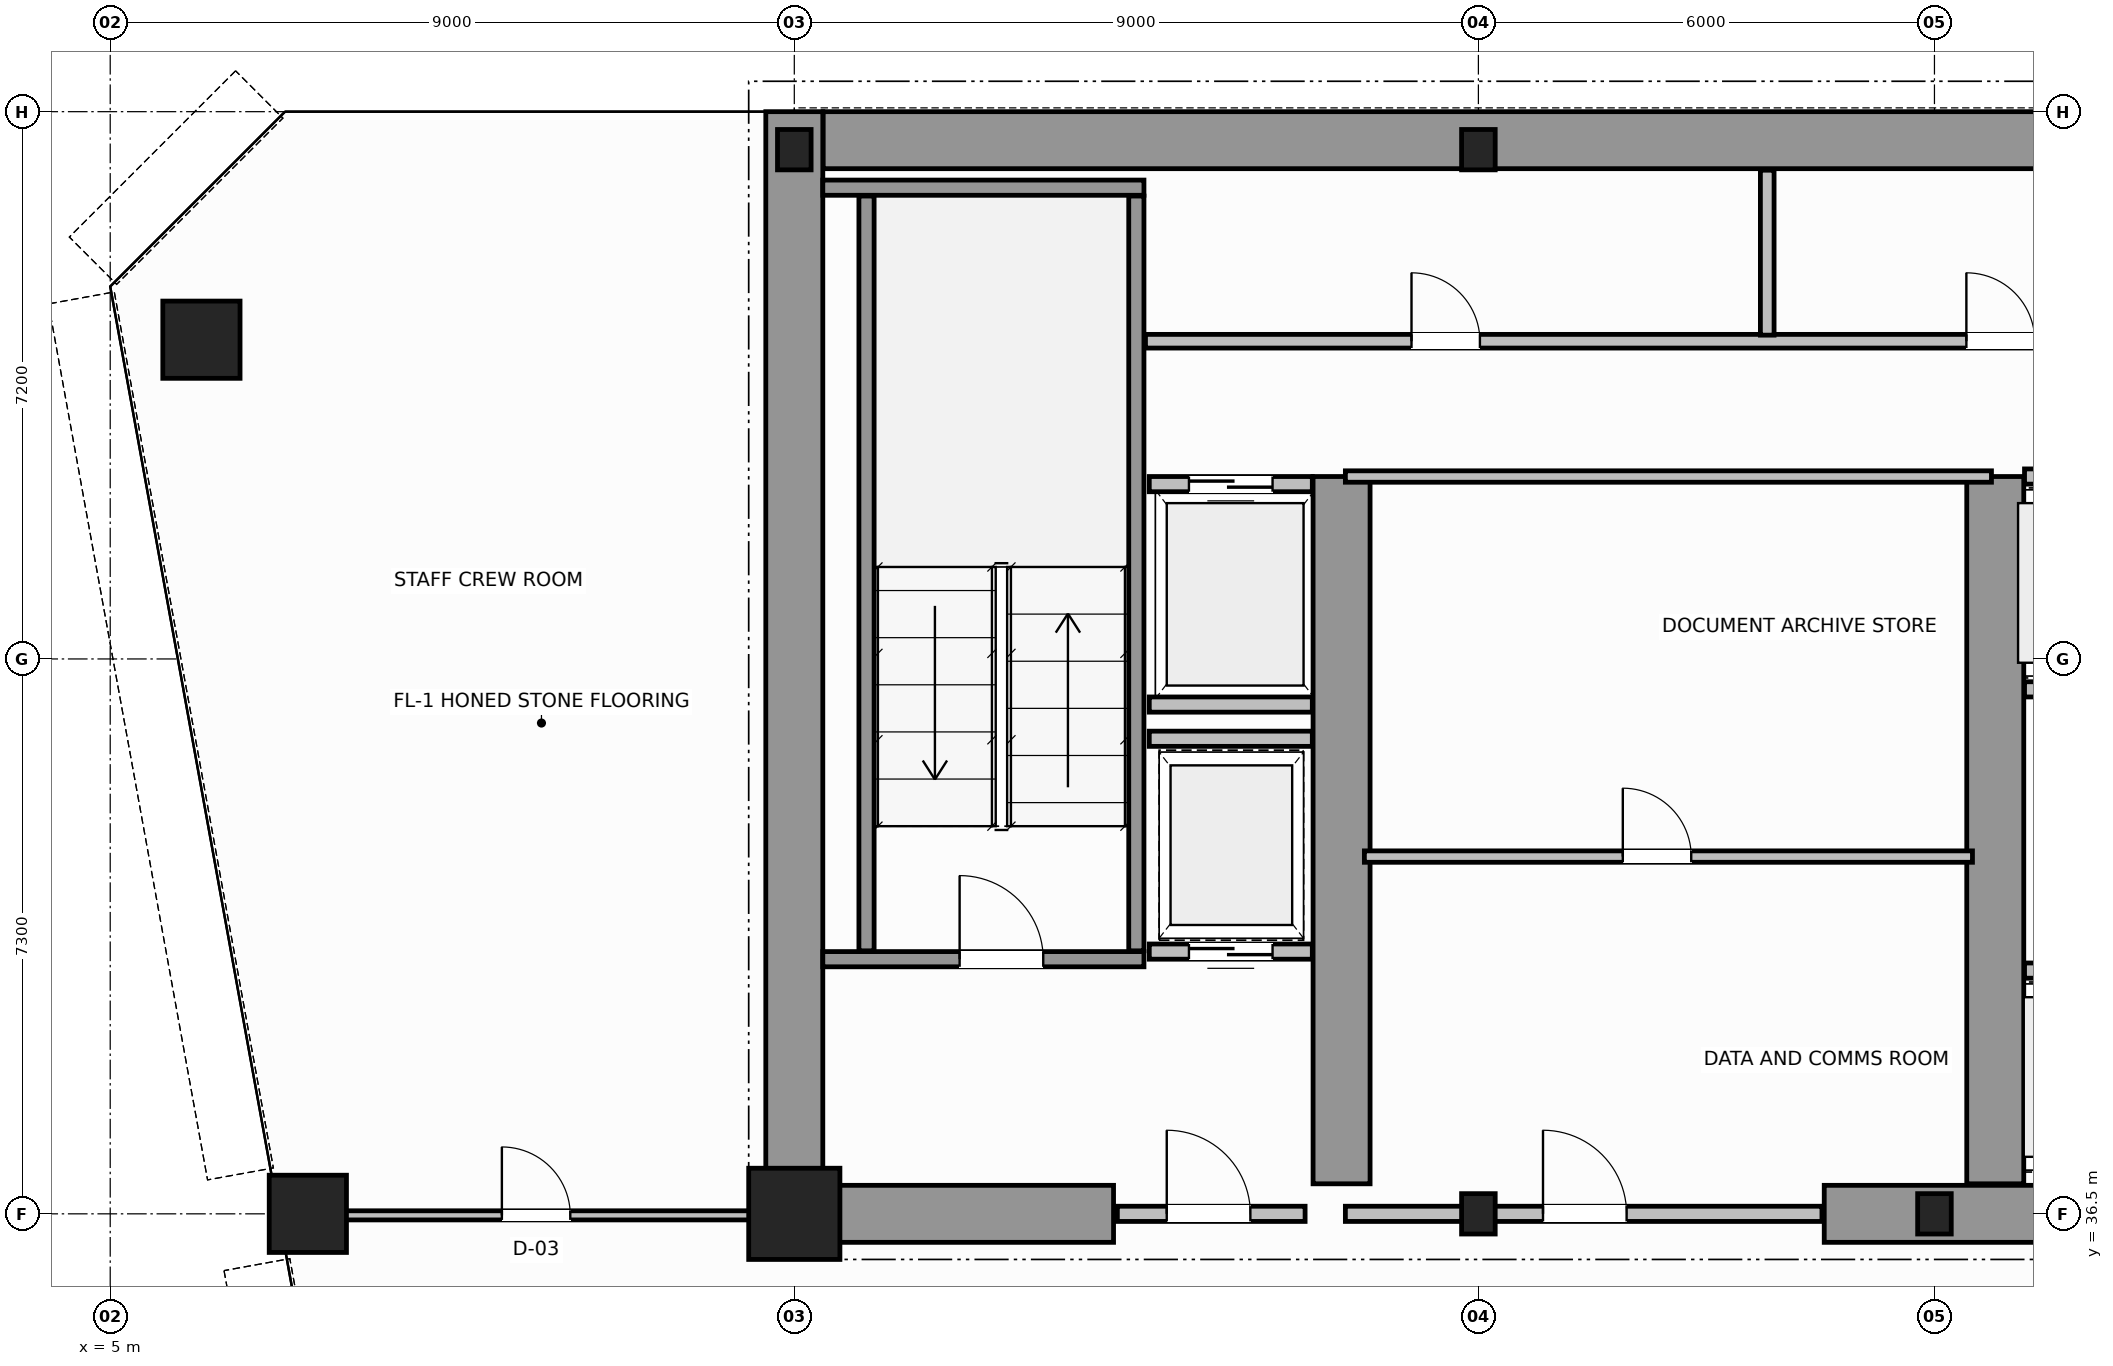
"""IFC4 building model, lengths in metres.
Left out: names, types, materials, properties, quantities, classifications, styles, units other than length and angle.
Written with IfcOpenShell. Run it as: python <this file> out.ifc"""

import sys

from ifc_helpers import new_model, si_unit, direction, frame, frame_2d, origin, origin_2d, place, context, subcontext, project, spatial, rectangle, hollow_circle, i_section, extrude, source, transform, mapped, element, fill, save


model = new_model("IFC4")
c1 = context("Model", 3, precision=1e-05, world=origin(), true_north=direction((0.0, 1.0)))
c2 = subcontext(c1, "Body", "Model", "MODEL_VIEW")
j1 = project(units=[si_unit("LENGTHUNIT", "METRE"), si_unit("PLANEANGLEUNIT", "RADIAN")], contexts=[c1])
p1 = place(None, origin())
s1 = spatial("IfcSite", under=j1, at=p1, CompositionType="ELEMENT")
p2 = place(p1, origin())
s2 = spatial("IfcBuilding", under=s1, at=p2, CompositionType="ELEMENT")
p3 = place(p2, frame((0.0, 0.0, 133.8)))
s3 = spatial("IfcBuildingStorey", under=s2, at=p3, CompositionType="ELEMENT", Elevation=133.8)
m1 = source(origin(), c2, "Body", "SweptSolid", [
    extrude(rectangle(XDim=1.2, YDim=1.2, at=origin_2d()), origin(), (0.0, 0.0, 1.0), 3.8),
])
p4 = place(p3, frame((14.0, 36.5, 0.0), z_axis=(0.0, 0.0, 1.0), x_axis=(1.0, 0.0, 0.0)))
e1 = element("IfcColumn", 1, at=p4, inside=s3, PredefinedType="COLUMN", context=c2, shape_type="MappedRepresentation", body=[
    mapped(m1, transform((0.0, 0.0, 0.0), scale=1.0)),
])
m2 = source(origin(), c2, "Body", "SweptSolid", [
    extrude(i_section(OverallWidth=0.442, OverallDepth=0.531, WebThickness=0.065, FlangeThickness=0.076, FilletRadius=0.015, at=origin_2d()), origin(), (0.0, 0.0, 1.0), 3.8),
])
for number, where, z_axis, x_axis in (
    (2, (23.0, 36.5, 0.0), (0.0, 0.0, 1.0), (1.0, 0.0, 0.0)),
    (3, (29.0, 36.5, 0.0), (0.0, 0.0, 1.0), (1.0, 0.0, 0.0)),
    (4, (14.0, 50.5, 0.0), (0.0, 0.0, 1.0), (1.0, 0.0, 0.0)),
    (5, (23.0, 50.5, 0.0), (0.0, 0.0, 1.0), (1.0, 0.0, 0.0)),
):
    element("IfcColumn", number, at=place(p3, frame(where, z_axis=z_axis, x_axis=x_axis)), inside=s3, PredefinedType="COLUMN", context=c2, shape_type="MappedRepresentation", body=[
        mapped(m2, transform((0.0, 0.0, 0.0), scale=1.0)),
    ])
m3 = source(origin(), c2, "Body", "SweptSolid", [
    extrude(hollow_circle(Radius=0.508, WallThickness=0.045, at=origin_2d()), origin(), (0.0, 0.0, 1.0), 3.8),
])
for number, where, z_axis, x_axis in (
    (6, (6.2, 48.0, 0.0), (0.0, 0.0, 1.0), (1.0, 0.0, 0.0)),
    (7, (7.6, 36.5, 0.0), (0.0, 0.0, 1.0), (1.0, 0.0, 0.0)),
):
    element("IfcColumn", number, at=place(p3, frame(where, z_axis=z_axis, x_axis=x_axis)), inside=s3, PredefinedType="COLUMN", context=c2, shape_type="MappedRepresentation", body=[
        mapped(m3, transform((0.0, 0.0, 0.0), scale=1.0)),
    ])
p5 = place(p3, frame((14.379, 50.625, 0.0), z_axis=(0.0, 0.0, 1.0), x_axis=(1.0, 0.0, 0.0)))
e8 = element("IfcWall", 8, at=p5, inside=s3, PredefinedType="SHEAR", context=c2, shape_type="SweptSolid", body=[
    extrude(rectangle(XDim=19.619, YDim=0.75, at=frame_2d((9.81, 0.0))), origin(), (0.0, 0.0, 1.0), 3.8),
])
p6 = place(p3, frame((14.0, 36.5, 0.0), z_axis=(0.0, 0.0, 1.0), x_axis=(0.0, 1.0, 0.0)))
e9 = element("IfcWall", 9, at=p6, inside=s3, PredefinedType="SHEAR", context=c2, shape_type="SweptSolid", body=[
    extrude(rectangle(XDim=14.5, YDim=0.75, at=frame_2d((7.25, 0.0))), origin(), (0.0, 0.0, 1.0), 3.8),
])
p7 = place(p3, frame((14.395, 36.5, 0.0), z_axis=(0.0, 0.0, 1.0), x_axis=(1.0, 0.0, 0.0)))
e10 = element("IfcWall", 10, at=p7, inside=s3, PredefinedType="SHEAR", context=c2, shape_type="SweptSolid", body=[
    extrude(rectangle(XDim=3.805, YDim=0.75, at=frame_2d((1.902, 0.0))), origin(), (0.0, 0.0, 1.0), 2.38),
])
p8 = place(p3, frame((27.55, 36.5, 0.0), z_axis=(0.0, 0.0, 1.0), x_axis=(1.0, 0.0, 0.0)))
e11 = element("IfcWall", 11, at=p8, inside=s3, PredefinedType="SHEAR", context=c2, shape_type="SweptSolid", body=[
    extrude(rectangle(XDim=4.5, YDim=0.75, at=frame_2d((2.25, 0.0))), origin(), (0.0, 0.0, 1.0), 3.8),
])
for number, where, z_axis, x_axis in (
    (12, (21.2, 36.895, 0.0), (0.0, 0.0, 1.0), (0.0, 1.0, 0.0)),
    (13, (29.8, 36.895, 0.0), (0.0, 0.0, 1.0), (0.0, 1.0, 0.0)),
):
    element("IfcWall", number, at=place(p3, frame(where, z_axis=z_axis, x_axis=x_axis)), inside=s3, PredefinedType="SHEAR", context=c2, shape_type="SweptSolid", body=[
        extrude(rectangle(XDim=9.305, YDim=0.75, at=frame_2d((4.652, 0.0))), origin(), (0.0, 0.0, 1.0), 3.8),
    ])
p9 = place(p3, frame((14.375, 39.85, 0.0), z_axis=(0.0, 0.0, 1.0), x_axis=(1.0, 0.0, 0.0)))
e14 = element("IfcWall", 14, at=p9, inside=s3, PredefinedType="SOLIDWALL", context=c2, shape_type="SweptSolid", body=[
    extrude(rectangle(XDim=4.225, YDim=0.2, at=frame_2d((2.113, 0.0))), origin(), (0.0, 0.0, 1.0), 3.8),
])
p10 = place(p9, frame((1.8, 0.0, 0.0)))
e15 = element("IfcOpeningElement", 15, at=p10, cuts=e14, PredefinedType="OPENING", context=c2, shape_type="SweptSolid", body=[
    extrude(rectangle(XDim=1.1, YDim=2.15, at=frame_2d((0.55, 1.075))), frame((0.0, 0.11, 0.0), z_axis=(0.0, -1.0, 0.0), x_axis=(1.0, 0.0, 0.0)), (0.0, 0.0, 1.0), 0.22),
])
p11 = place(p3, frame((14.375, 50.0, 0.0), z_axis=(0.0, 0.0, 1.0), x_axis=(1.0, 0.0, 0.0)))
e16 = element("IfcWall", 16, at=p11, inside=s3, PredefinedType="SOLIDWALL", context=c2, shape_type="SweptSolid", body=[
    extrude(rectangle(XDim=4.225, YDim=0.2, at=frame_2d((2.113, 0.0))), origin(), (0.0, 0.0, 1.0), 3.8),
])
for number, where, z_axis, x_axis in (
    (17, (14.95, 39.96, 0.0), (0.0, 0.0, 1.0), (0.0, 1.0, 0.0)),
    (18, (18.5, 39.96, 0.0), (0.0, 0.0, 1.0), (0.0, 1.0, 0.0)),
):
    element("IfcWall", number, at=place(p3, frame(where, z_axis=z_axis, x_axis=x_axis)), inside=s3, PredefinedType="SOLIDWALL", context=c2, shape_type="SweptSolid", body=[
        extrude(rectangle(XDim=9.93, YDim=0.2, at=frame_2d((4.965, 0.0))), origin(), (0.0, 0.0, 1.0), 3.8),
    ])
p12 = place(p3, frame((18.25, 36.5, 0.0), z_axis=(0.0, 0.0, 1.0), x_axis=(1.0, 0.0, 0.0)))
e19 = element("IfcWall", 19, at=p12, inside=s3, PredefinedType="SOLIDWALL", context=c2, shape_type="SweptSolid", body=[
    extrude(rectangle(XDim=2.47, YDim=0.2, at=frame_2d((1.235, 0.0))), origin(), (0.0, 0.0, 1.0), 2.37),
])
p13 = place(p12, frame((0.65, 0.0, 0.0)))
e20 = element("IfcOpeningElement", 20, at=p13, cuts=e19, PredefinedType="OPENING", context=c2, shape_type="SweptSolid", body=[
    extrude(rectangle(XDim=1.1, YDim=2.15, at=frame_2d((0.55, 1.075))), frame((0.0, 0.11, 0.0), z_axis=(0.0, -1.0, 0.0), x_axis=(1.0, 0.0, 0.0)), (0.0, 0.0, 1.0), 0.22),
])
p14 = place(p3, frame((30.185, 39.7, 0.0), z_axis=(0.0, 0.0, 1.0), x_axis=(1.0, 0.0, 0.0)))
e21 = element("IfcWall", 21, at=p14, inside=s3, PredefinedType="SOLIDWALL", context=c2, shape_type="SweptSolid", body=[
    extrude(rectangle(XDim=1.845, YDim=0.2, at=frame_2d((0.922, 0.0))), origin(), (0.0, 0.0, 1.0), 3.58),
])
p15 = place(p14, frame((0.373, 0.0, 0.0)))
e22 = element("IfcOpeningElement", 22, at=p15, cuts=e21, PredefinedType="OPENING", context=c2, shape_type="SweptSolid", body=[
    extrude(rectangle(XDim=1.1, YDim=2.15, at=frame_2d((0.55, 1.075))), frame((0.0, 0.11, 0.0), z_axis=(0.0, -1.0, 0.0), x_axis=(1.0, 0.0, 0.0)), (0.0, 0.0, 1.0), 0.22),
])
p16 = place(p3, frame((30.185, 43.4, 0.0), z_axis=(0.0, 0.0, 1.0), x_axis=(1.0, 0.0, 0.0)))
e23 = element("IfcWall", 23, at=p16, inside=s3, PredefinedType="SOLIDWALL", context=c2, shape_type="SweptSolid", body=[
    extrude(rectangle(XDim=1.725, YDim=0.2, at=frame_2d((0.862, 0.0))), origin(), (0.0, 0.0, 1.0), 3.58),
])
p17 = place(p16, frame((0.313, 0.0, 0.0)))
e24 = element("IfcOpeningElement", 24, at=p17, cuts=e23, PredefinedType="OPENING", context=c2, shape_type="SweptSolid", body=[
    extrude(rectangle(XDim=1.1, YDim=2.15, at=frame_2d((0.55, 1.075))), frame((0.0, 0.11, 0.0), z_axis=(0.0, -1.0, 0.0), x_axis=(1.0, 0.0, 0.0)), (0.0, 0.0, 1.0), 0.22),
])
p18 = place(p3, frame((30.185, 46.2, 0.0), z_axis=(0.0, 0.0, 1.0), x_axis=(1.0, 0.0, 0.0)))
e25 = element("IfcWall", 25, at=p18, inside=s3, PredefinedType="SOLIDWALL", context=c2, shape_type="SweptSolid", body=[
    extrude(rectangle(XDim=1.725, YDim=0.2, at=frame_2d((0.862, 0.0))), origin(), (0.0, 0.0, 1.0), 3.58),
])
p19 = place(p3, frame((18.67, 46.1, 0.0), z_axis=(0.0, 0.0, 1.0), x_axis=(1.0, 0.0, 0.0)))
e26 = element("IfcWall", 26, at=p19, inside=s3, PredefinedType="SOLIDWALL", context=c2, shape_type="SweptSolid", body=[
    extrude(rectangle(XDim=2.145, YDim=0.2, at=frame_2d((1.073, 0.0))), origin(), (0.0, 0.0, 1.0), 3.58),
])
p20 = place(p19, frame((0.522, 0.0, 0.0)))
e27 = element("IfcOpeningElement", 27, at=p20, cuts=e26, PredefinedType="OPENING", context=c2, shape_type="SweptSolid", body=[
    extrude(rectangle(XDim=1.1, YDim=2.15, at=frame_2d((0.55, 1.075))), frame((0.0, 0.11, 0.0), z_axis=(0.0, -1.0, 0.0), x_axis=(1.0, 0.0, 0.0)), (0.0, 0.0, 1.0), 0.22),
])
p21 = place(p3, frame((18.67, 43.2, 0.0), z_axis=(0.0, 0.0, 1.0), x_axis=(1.0, 0.0, 0.0)))
e28 = element("IfcWall", 28, at=p21, inside=s3, PredefinedType="SOLIDWALL", context=c2, shape_type="SweptSolid", body=[
    extrude(rectangle(XDim=2.145, YDim=0.2, at=frame_2d((1.073, 0.0))), origin(), (0.0, 0.0, 1.0), 3.58),
])
p22 = place(p3, frame((18.67, 39.95, 0.0), z_axis=(0.0, 0.0, 1.0), x_axis=(1.0, 0.0, 0.0)))
e29 = element("IfcWall", 29, at=p22, inside=s3, PredefinedType="SOLIDWALL", context=c2, shape_type="SweptSolid", body=[
    extrude(rectangle(XDim=2.145, YDim=0.2, at=frame_2d((1.073, 0.0))), origin(), (0.0, 0.0, 1.0), 3.58),
])
p23 = place(p22, frame((0.522, 0.0, 0.0)))
e30 = element("IfcOpeningElement", 30, at=p23, cuts=e29, PredefinedType="OPENING", context=c2, shape_type="SweptSolid", body=[
    extrude(rectangle(XDim=1.1, YDim=2.15, at=frame_2d((0.55, 1.075))), frame((0.0, 0.11, 0.0), z_axis=(0.0, -1.0, 0.0), x_axis=(1.0, 0.0, 0.0)), (0.0, 0.0, 1.0), 0.22),
])
p24 = place(p3, frame((18.67, 42.75, 0.0), z_axis=(0.0, 0.0, 1.0), x_axis=(1.0, 0.0, 0.0)))
e31 = element("IfcWall", 31, at=p24, inside=s3, PredefinedType="SOLIDWALL", context=c2, shape_type="SweptSolid", body=[
    extrude(rectangle(XDim=2.145, YDim=0.2, at=frame_2d((1.073, 0.0))), origin(), (0.0, 0.0, 1.0), 3.58),
])
p25 = place(p3, frame((21.25, 36.5, 0.0), z_axis=(0.0, 0.0, 1.0), x_axis=(1.0, 0.0, 0.0)))
e32 = element("IfcWall", 32, at=p25, inside=s3, PredefinedType="SOLIDWALL", context=c2, shape_type="SweptSolid", body=[
    extrude(rectangle(XDim=6.27, YDim=0.2, at=frame_2d((3.135, 0.0))), origin(), (0.0, 0.0, 1.0), 2.37),
])
p26 = place(p25, frame((2.6, 0.0, 0.0)))
e33 = element("IfcOpeningElement", 33, at=p26, cuts=e32, PredefinedType="OPENING", context=c2, shape_type="SweptSolid", body=[
    extrude(rectangle(XDim=1.1, YDim=2.15, at=frame_2d((0.55, 1.075))), frame((0.0, 0.11, 0.0), z_axis=(0.0, -1.0, 0.0), x_axis=(1.0, 0.0, 0.0)), (0.0, 0.0, 1.0), 0.22),
])
p27 = place(p3, frame((21.25, 46.2, 0.0), z_axis=(0.0, 0.0, 1.0), x_axis=(1.0, 0.0, 0.0)))
e34 = element("IfcWall", 34, at=p27, inside=s3, PredefinedType="PARTITIONING", context=c2, shape_type="SweptSolid", body=[
    extrude(rectangle(XDim=8.5, YDim=0.15, at=frame_2d((4.25, 0.0))), origin(), (0.0, 0.0, 1.0), 3.58),
])
p28 = place(p3, frame((21.5, 41.2, 0.0), z_axis=(0.0, 0.0, 1.0), x_axis=(1.0, 0.0, 0.0)))
e35 = element("IfcWall", 35, at=p28, inside=s3, PredefinedType="PARTITIONING", context=c2, shape_type="SweptSolid", body=[
    extrude(rectangle(XDim=8.0, YDim=0.15, at=frame_2d((4.0, 0.0))), origin(), (0.0, 0.0, 1.0), 3.58),
])
p29 = place(p28, frame((3.4, 0.0, 0.0)))
e36 = element("IfcOpeningElement", 36, at=p29, cuts=e35, PredefinedType="OPENING", context=c2, shape_type="SweptSolid", body=[
    extrude(rectangle(XDim=0.9, YDim=2.1, at=frame_2d((0.45, 1.05))), frame((0.0, 0.085, 0.0), z_axis=(0.0, -1.0, 0.0), x_axis=(1.0, 0.0, 0.0)), (0.0, 0.0, 1.0), 0.17),
])
p30 = place(p3, frame((18.62, 47.98, 0.0), z_axis=(0.0, 0.0, 1.0), x_axis=(1.0, 0.0, 0.0)))
e37 = element("IfcWall", 37, at=p30, inside=s3, PredefinedType="PLUMBINGWALL", context=c2, shape_type="SweptSolid", body=[
    extrude(rectangle(XDim=20.06, YDim=0.18, at=frame_2d((10.03, 0.0))), origin(), (0.0, 0.0, 1.0), 3.58),
])
p31 = place(p30, frame((3.5, 0.0, 0.0)))
e38 = element("IfcOpeningElement", 38, at=p31, cuts=e37, PredefinedType="OPENING", context=c2, shape_type="SweptSolid", body=[
    extrude(rectangle(XDim=0.9, YDim=2.15, at=frame_2d((0.45, 1.075))), frame((0.0, 0.1, 0.0), z_axis=(0.0, -1.0, 0.0), x_axis=(1.0, 0.0, 0.0)), (0.0, 0.0, 1.0), 0.2),
])
p32 = place(p30, frame((10.8, 0.0, 0.0)))
e39 = element("IfcOpeningElement", 39, at=p32, cuts=e37, PredefinedType="OPENING", context=c2, shape_type="SweptSolid", body=[
    extrude(rectangle(XDim=0.9, YDim=2.15, at=frame_2d((0.45, 1.075))), frame((0.0, 0.1, 0.0), z_axis=(0.0, -1.0, 0.0), x_axis=(1.0, 0.0, 0.0)), (0.0, 0.0, 1.0), 0.2),
])
p33 = place(p30, frame((16.8, 0.0, 0.0)))
e40 = element("IfcOpeningElement", 40, at=p33, cuts=e37, PredefinedType="OPENING", context=c2, shape_type="SweptSolid", body=[
    extrude(rectangle(XDim=0.9, YDim=2.15, at=frame_2d((0.45, 1.075))), frame((0.0, 0.1, 0.0), z_axis=(0.0, -1.0, 0.0), x_axis=(1.0, 0.0, 0.0)), (0.0, 0.0, 1.0), 0.2),
])
p34 = place(p3, frame((26.8, 48.06, 0.0), z_axis=(0.0, 0.0, 1.0), x_axis=(0.0, 1.0, 0.0)))
e41 = element("IfcWall", 41, at=p34, inside=s3, PredefinedType="PLUMBINGWALL", context=c2, shape_type="SweptSolid", body=[
    extrude(rectangle(XDim=2.17, YDim=0.18, at=frame_2d((1.085, 0.0))), origin(), (0.0, 0.0, 1.0), 3.58),
])
p35 = place(p3, frame((7.265, 36.48, 0.0), z_axis=(0.0, 0.0, 1.0), x_axis=(1.0, 0.0, 0.0)))
e42 = element("IfcWall", 42, at=p35, inside=s3, PredefinedType="PARTITIONING", context=c2, shape_type="SweptSolid", body=[
    extrude(rectangle(XDim=6.675, YDim=0.12, at=frame_2d((3.337, 0.0))), origin(), (0.0, 0.0, 1.0), 2.87),
])
p36 = place(p35, frame((2.888, 0.0, 0.0)))
e43 = element("IfcOpeningElement", 43, at=p36, cuts=e42, PredefinedType="OPENING", context=c2, shape_type="SweptSolid", body=[
    extrude(rectangle(XDim=0.9, YDim=2.15, at=frame_2d((0.45, 1.075))), frame((0.0, 0.07, 0.0), z_axis=(0.0, -1.0, 0.0), x_axis=(1.0, 0.0, 0.0)), (0.0, 0.0, 1.0), 0.14),
])
m4 = source(origin(), c2, "Body", "SweptSolid", [
    extrude(rectangle(XDim=1.1, YDim=2.15, at=frame_2d((0.55, 1.075))), frame((0.0, 0.025, 0.0), z_axis=(0.0, -1.0, 0.0), x_axis=(1.0, 0.0, 0.0)), (0.0, 0.0, 1.0), 0.05),
])
p37 = place(p10, origin())
e44 = element("IfcDoor", 44, at=p37, inside=s3, OperationType="SINGLE_SWING_LEFT", PredefinedType="DOOR", context=c2, shape_type="MappedRepresentation", body=[
    mapped(m4, transform((0.0, 0.0, 0.0), scale=1.0)),
])
fill(e15, e44)
p38 = place(p13, origin())
e45 = element("IfcDoor", 45, at=p38, inside=s3, OperationType="SINGLE_SWING_RIGHT", PredefinedType="DOOR", context=c2, shape_type="MappedRepresentation", body=[
    mapped(m4, transform((0.0, 0.0, 0.0), scale=1.0)),
])
fill(e20, e45)
p39 = place(p20, origin())
e46 = element("IfcDoor", 46, at=p39, inside=s3, OperationType="DOUBLE_DOOR_SLIDING", PredefinedType="DOOR", context=c2, shape_type="MappedRepresentation", body=[
    mapped(m4, transform((0.0, 0.0, 0.0), scale=1.0)),
])
fill(e27, e46)
p40 = place(p23, origin())
e47 = element("IfcDoor", 47, at=p40, inside=s3, OperationType="DOUBLE_DOOR_SLIDING", PredefinedType="DOOR", context=c2, shape_type="MappedRepresentation", body=[
    mapped(m4, transform((0.0, 0.0, 0.0), scale=1.0)),
])
fill(e30, e47)
p41 = place(p26, origin())
e48 = element("IfcDoor", 48, at=p41, inside=s3, OperationType="SINGLE_SWING_LEFT", PredefinedType="DOOR", context=c2, shape_type="MappedRepresentation", body=[
    mapped(m4, transform((0.0, 0.0, 0.0), scale=1.0)),
])
fill(e33, e48)
m5 = source(origin(), c2, "Body", "SweptSolid", [
    extrude(rectangle(XDim=0.9, YDim=2.1, at=frame_2d((0.45, 1.05))), frame((0.0, 0.025, 0.0), z_axis=(0.0, -1.0, 0.0), x_axis=(1.0, 0.0, 0.0)), (0.0, 0.0, 1.0), 0.05),
])
p42 = place(p29, origin())
e49 = element("IfcDoor", 49, at=p42, inside=s3, OperationType="SINGLE_SWING_RIGHT", PredefinedType="DOOR", context=c2, shape_type="MappedRepresentation", body=[
    mapped(m5, transform((0.0, 0.0, 0.0), scale=1.0)),
])
fill(e36, e49)
m6 = source(origin(), c2, "Body", "SweptSolid", [
    extrude(rectangle(XDim=0.9, YDim=2.15, at=frame_2d((0.45, 1.075))), frame((0.0, 0.025, 0.0), z_axis=(0.0, -1.0, 0.0), x_axis=(1.0, 0.0, 0.0)), (0.0, 0.0, 1.0), 0.05),
])
p43 = place(p31, origin())
e50 = element("IfcDoor", 50, at=p43, inside=s3, OperationType="SINGLE_SWING_LEFT", PredefinedType="DOOR", context=c2, shape_type="MappedRepresentation", body=[
    mapped(m6, transform((0.0, 0.0, 0.0), scale=1.0)),
])
fill(e38, e50)
p44 = place(p32, origin())
e51 = element("IfcDoor", 51, at=p44, inside=s3, OperationType="SINGLE_SWING_RIGHT", PredefinedType="DOOR", context=c2, shape_type="MappedRepresentation", body=[
    mapped(m6, transform((0.0, 0.0, 0.0), scale=1.0)),
])
fill(e39, e51)
p45 = place(p36, origin())
e52 = element("IfcDoor", 52, at=p45, inside=s3, OperationType="SINGLE_SWING_LEFT", PredefinedType="DOOR", context=c2, shape_type="MappedRepresentation", body=[
    mapped(m6, transform((0.0, 0.0, 0.0), scale=1.0)),
])
fill(e43, e52)
save(model, sys.argv[1])
